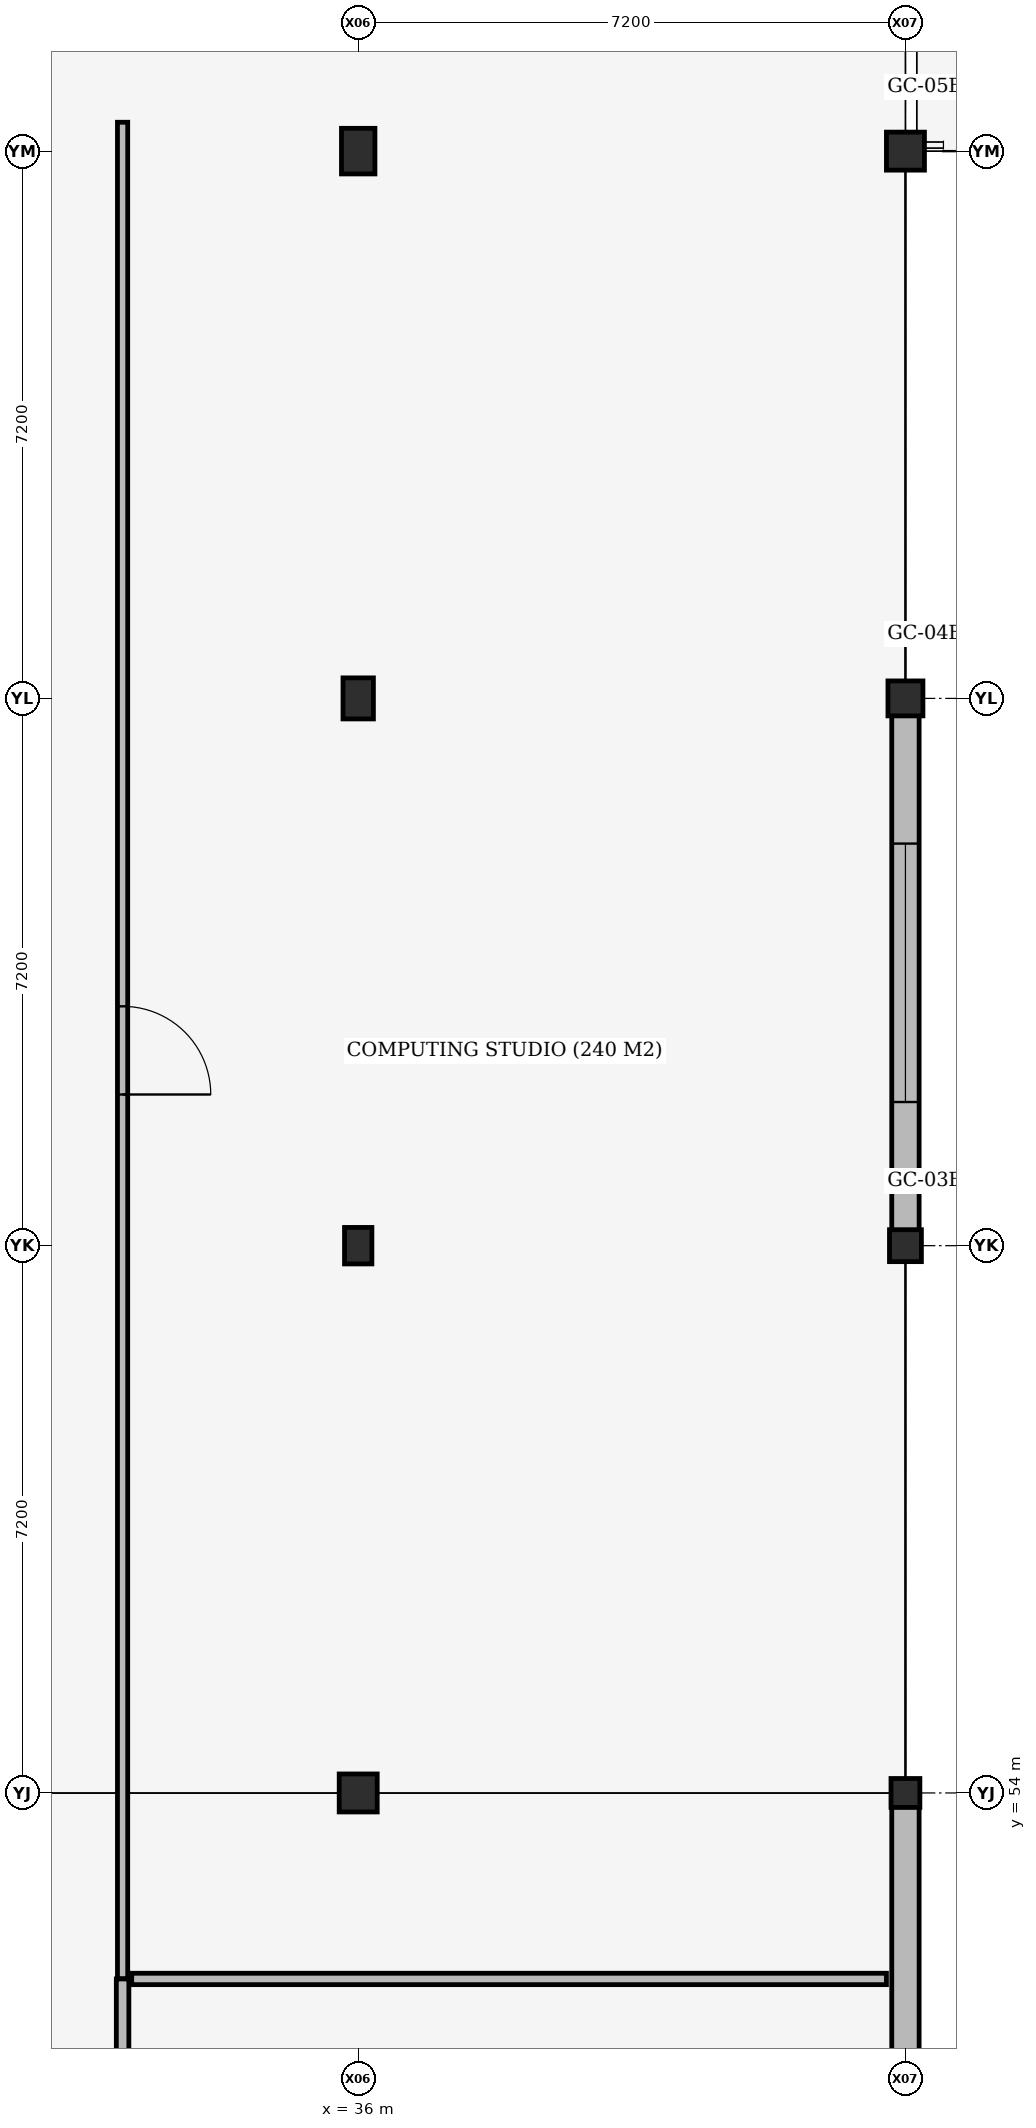
"""IFC4 building model, lengths in metres.
Left out: names, types, materials, properties, quantities, classifications, styles, units other than length and angle.
Written with IfcOpenShell. Run it as: python <this file> out.ifc"""

import sys

from ifc_helpers import new_model, si_unit, direction, frame, frame_2d, origin, origin_2d, place, context, subcontext, project, spatial, rectangle, extrude, element, fill, save


model = new_model("IFC4")
c1 = context("Model", 3, precision=1e-05, world=origin(), true_north=direction((0.0, 1.0)))
c2 = subcontext(c1, "Body", "Model", "MODEL_VIEW")
j1 = project(units=[si_unit("LENGTHUNIT", "METRE"), si_unit("PLANEANGLEUNIT", "RADIAN")], contexts=[c1])
p1 = place(None, origin())
s1 = spatial("IfcSite", under=j1, at=p1, CompositionType="ELEMENT")
p2 = place(p1, origin())
s2 = spatial("IfcBuilding", under=s1, at=p2, CompositionType="ELEMENT")
p3 = place(p2, frame((0.0, 0.0, 9.6)))
s3 = spatial("IfcBuildingStorey", under=s2, at=p3, CompositionType="ELEMENT", Elevation=9.6)
p4 = place(p3, frame((36.0, 54.0, 0.0), z_axis=(0.0, 0.0, 1.0), x_axis=(1.0, 0.0, 0.0)))
e1 = element("IfcColumn", 1, at=p4, inside=s3, PredefinedType="COLUMN", context=c2, shape_type="SweptSolid", body=[
    extrude(rectangle(XDim=0.5, YDim=0.5, at=origin_2d()), origin(), (0.0, 0.0, 1.0), 3.89),
])
p5 = place(p3, frame((36.0, 61.2, 0.0), z_axis=(0.0, 0.0, 1.0), x_axis=(1.0, 0.0, 0.0)))
e2 = element("IfcColumn", 2, at=p5, inside=s3, PredefinedType="COLUMN", context=c2, shape_type="SweptSolid", body=[
    extrude(rectangle(XDim=0.36, YDim=0.48, at=origin_2d()), origin(), (0.0, 0.0, 1.0), 3.89),
])
p6 = place(p3, frame((36.0, 68.4, 0.0), z_axis=(0.0, 0.0, 1.0), x_axis=(1.0, 0.0, 0.0)))
e3 = element("IfcColumn", 3, at=p6, inside=s3, PredefinedType="COLUMN", context=c2, shape_type="SweptSolid", body=[
    extrude(rectangle(XDim=0.4, YDim=0.54, at=origin_2d()), origin(), (0.0, 0.0, 1.0), 3.89),
])
p7 = place(p3, frame((36.0, 75.6, 0.0), z_axis=(0.0, 0.0, 1.0), x_axis=(1.0, 0.0, 0.0)))
e4 = element("IfcColumn", 4, at=p7, inside=s3, PredefinedType="COLUMN", context=c2, shape_type="SweptSolid", body=[
    extrude(rectangle(XDim=0.44, YDim=0.6, at=origin_2d()), origin(), (0.0, 0.0, 1.0), 3.89),
])
p8 = place(p3, frame((43.2, 54.0, 0.0), z_axis=(0.0, 0.0, 1.0), x_axis=(1.0, 0.0, 0.0)))
e5 = element("IfcColumn", 5, at=p8, inside=s3, PredefinedType="COLUMN", context=c2, shape_type="SweptSolid", body=[
    extrude(rectangle(XDim=0.38, YDim=0.38, at=origin_2d()), origin(), (0.0, 0.0, 1.0), 3.89),
])
p9 = place(p3, frame((43.2, 61.2, 0.0), z_axis=(0.0, 0.0, 1.0), x_axis=(1.0, 0.0, 0.0)))
e6 = element("IfcColumn", 6, at=p9, inside=s3, PredefinedType="COLUMN", context=c2, shape_type="SweptSolid", body=[
    extrude(rectangle(XDim=0.42, YDim=0.42, at=origin_2d()), origin(), (0.0, 0.0, 1.0), 3.89),
])
p10 = place(p3, frame((43.2, 68.4, 0.0), z_axis=(0.0, 0.0, 1.0), x_axis=(1.0, 0.0, 0.0)))
e7 = element("IfcColumn", 7, at=p10, inside=s3, PredefinedType="COLUMN", context=c2, shape_type="SweptSolid", body=[
    extrude(rectangle(XDim=0.46, YDim=0.46, at=origin_2d()), origin(), (0.0, 0.0, 1.0), 3.89),
])
p11 = place(p3, frame((43.2, 75.6, 0.0), z_axis=(0.0, 0.0, 1.0), x_axis=(1.0, 0.0, 0.0)))
e8 = element("IfcColumn", 8, at=p11, inside=s3, PredefinedType="COLUMN", context=c2, shape_type="SweptSolid", body=[
    extrude(rectangle(XDim=0.5, YDim=0.5, at=origin_2d()), origin(), (0.0, 0.0, 1.0), 3.89),
])
p12 = place(p3, frame((43.2, 53.818, 0.0), z_axis=(0.0, 0.0, 1.0), x_axis=(0.0, -1.0, 0.0)))
e9 = element("IfcWall", 9, at=p12, inside=s3, PredefinedType="STANDARD", context=c2, shape_type="SweptSolid", body=[
    extrude(rectangle(XDim=10.456, YDim=0.36, at=frame_2d((5.228, 0.0))), origin(), (0.0, 0.0, 1.0), 3.21),
])
p13 = place(p12, frame((3.528, 0.0, 0.9)))
e10 = element("IfcOpeningElement", 10, at=p13, cuts=e9, PredefinedType="OPENING", context=c2, shape_type="SweptSolid", body=[
    extrude(rectangle(XDim=3.4, YDim=1.5, at=frame_2d((1.7, 0.75))), frame((0.0, 0.19, 0.0), z_axis=(0.0, -1.0, 0.0), x_axis=(1.0, 0.0, 0.0)), (0.0, 0.0, 1.0), 0.38),
])
p14 = place(p3, frame((43.2, 68.178, 0.0), z_axis=(0.0, 0.0, 1.0), x_axis=(0.0, -1.0, 0.0)))
e11 = element("IfcWall", 11, at=p14, inside=s3, PredefinedType="STANDARD", context=c2, shape_type="SweptSolid", body=[
    extrude(rectangle(XDim=6.776, YDim=0.36, at=frame_2d((3.388, 0.0))), origin(), (0.0, 0.0, 1.0), 3.37),
])
p15 = place(p14, frame((1.688, 0.0, 0.9)))
e12 = element("IfcOpeningElement", 12, at=p15, cuts=e11, PredefinedType="OPENING", context=c2, shape_type="SweptSolid", body=[
    extrude(rectangle(XDim=3.4, YDim=1.5, at=frame_2d((1.7, 0.75))), frame((0.0, 0.19, 0.0), z_axis=(0.0, -1.0, 0.0), x_axis=(1.0, 0.0, 0.0)), (0.0, 0.0, 1.0), 0.38),
])
p16 = place(p3, frame((32.9, 28.42, 0.0), z_axis=(0.0, 0.0, 1.0), x_axis=(0.0, 1.0, 0.0)))
e13 = element("IfcWall", 13, at=p16, inside=s3, PredefinedType="PARTITIONING", context=c2, shape_type="SweptSolid", body=[
    extrude(rectangle(XDim=23.133, YDim=0.165, at=frame_2d((11.566, 0.0))), origin(), (0.0, 0.0, 1.0), 3.21),
])
p17 = place(p16, frame((11.042, 0.0, 0.0)))
e14 = element("IfcOpeningElement", 14, at=p17, cuts=e13, PredefinedType="OPENING", context=c2, shape_type="SweptSolid", body=[
    extrude(rectangle(XDim=1.05, YDim=2.2, at=frame_2d((0.525, 1.1))), frame((0.0, 0.093, 0.0), z_axis=(0.0, -1.0, 0.0), x_axis=(1.0, 0.0, 0.0)), (0.0, 0.0, 1.0), 0.185),
])
p18 = place(p3, frame((33.02, 51.553, 0.0), z_axis=(0.0, 0.0, 1.0), x_axis=(1.0, 0.0, 0.0)))
e15 = element("IfcWall", 15, at=p18, inside=s3, PredefinedType="PARTITIONING", context=c2, shape_type="SweptSolid", body=[
    extrude(rectangle(XDim=9.93, YDim=0.15, at=frame_2d((4.965, 0.0))), origin(), (0.0, 0.0, 1.0), 3.31),
])
p19 = place(p3, frame((32.9, 51.558, 0.0), z_axis=(0.0, 0.0, 1.0), x_axis=(0.0, 1.0, 0.0)))
e16 = element("IfcWall", 16, at=p19, inside=s3, PredefinedType="PARTITIONING", context=c2, shape_type="SweptSolid", body=[
    extrude(rectangle(XDim=24.422, YDim=0.135, at=frame_2d((12.211, 0.0))), origin(), (0.0, 0.0, 1.0), 3.25),
])
p20 = place(p19, frame((11.631, 0.0, 0.0)))
e17 = element("IfcOpeningElement", 17, at=p20, cuts=e16, PredefinedType="OPENING", context=c2, shape_type="SweptSolid", body=[
    extrude(rectangle(XDim=1.16, YDim=2.2, at=frame_2d((0.58, 1.1))), frame((0.0, 0.077, 0.0), z_axis=(0.0, -1.0, 0.0), x_axis=(1.0, 0.0, 0.0)), (0.0, 0.0, 1.0), 0.155),
])
p21 = place(p15, origin())
e18 = element("IfcWindow", 18, at=p21, inside=s3, PartitioningType="DOUBLE_PANEL_VERTICAL", PredefinedType="WINDOW", context=c2, shape_type="SweptSolid", body=[
    extrude(rectangle(XDim=3.4, YDim=1.5, at=frame_2d((1.7, 0.75))), frame((0.0, 0.03, 0.0), z_axis=(0.0, -1.0, 0.0), x_axis=(1.0, 0.0, 0.0)), (0.0, 0.0, 1.0), 0.06),
])
fill(e12, e18)
p22 = place(p20, origin())
e19 = element("IfcDoor", 19, at=p22, inside=s3, OperationType="SINGLE_SWING_RIGHT", PredefinedType="DOOR", context=c2, shape_type="SweptSolid", body=[
    extrude(rectangle(XDim=1.16, YDim=2.2, at=frame_2d((0.58, 1.1))), frame((0.0, 0.025, 0.0), z_axis=(0.0, -1.0, 0.0), x_axis=(1.0, 0.0, 0.0)), (0.0, 0.0, 1.0), 0.05),
])
fill(e17, e19)
save(model, sys.argv[1])
